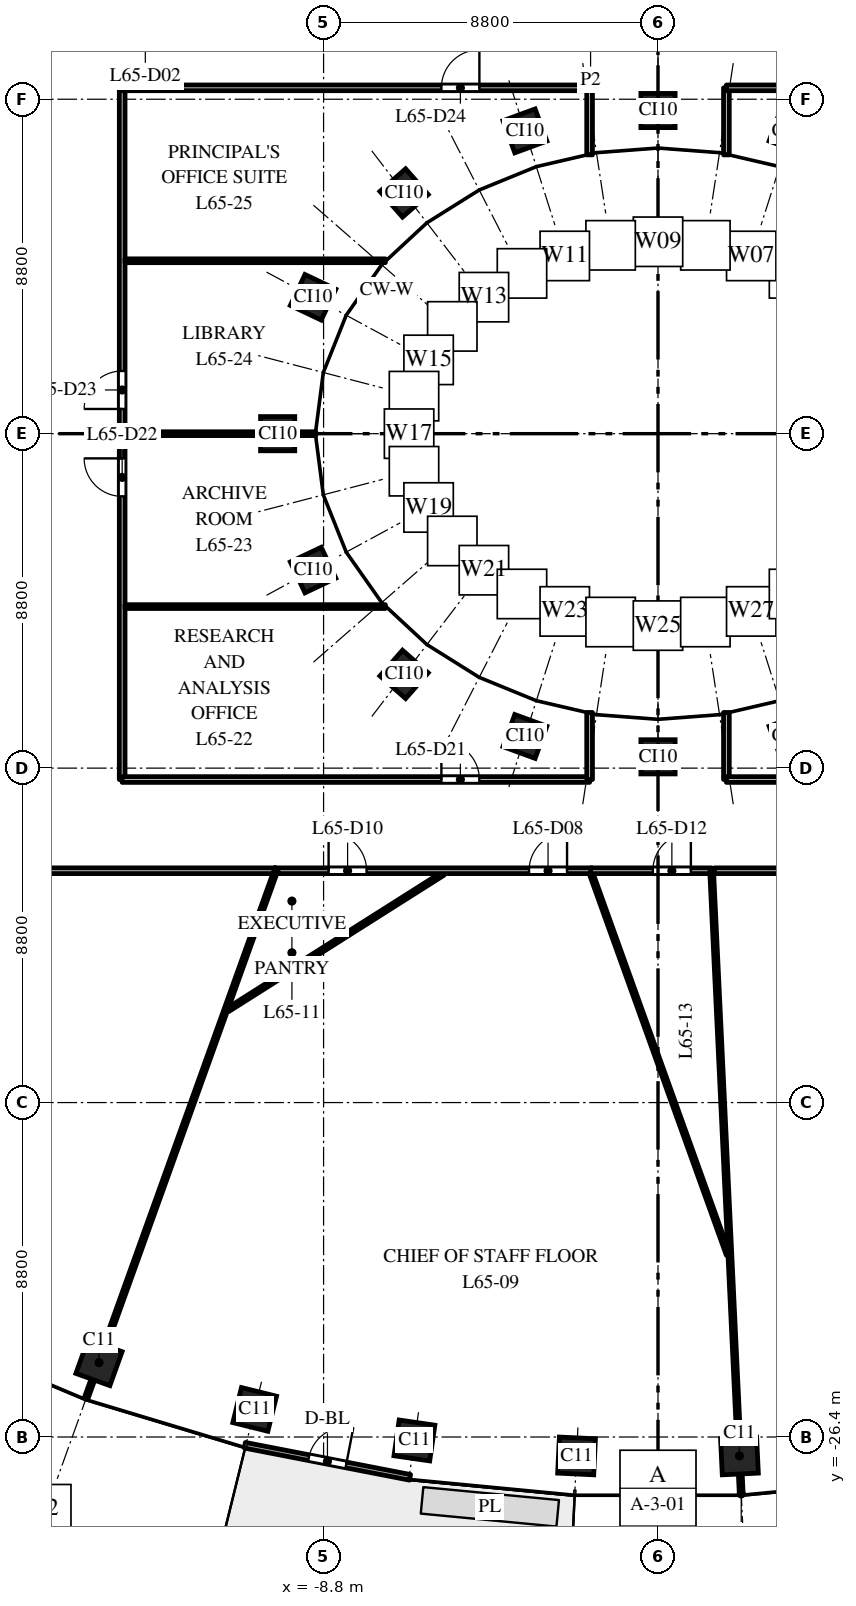
"""IFC4 building model, lengths in metres.
Left out: names, types, materials, properties, quantities, classifications, styles, units other than length and angle.
Written with IfcOpenShell. Run it as: python <this file> out.ifc"""

import sys

from ifc_helpers import new_model, si_unit, direction, frame, frame_2d, origin, origin_2d, place, context, subcontext, project, spatial, rectangle, extrude, element, fill, save


model = new_model("IFC4")
c1 = context("Model", 3, precision=1e-05, world=origin(), true_north=direction((0.0, 1.0)))
c2 = subcontext(c1, "Body", "Model", "MODEL_VIEW")
j1 = project(units=[si_unit("LENGTHUNIT", "METRE"), si_unit("PLANEANGLEUNIT", "RADIAN")], contexts=[c1])
p1 = place(None, origin())
s1 = spatial("IfcSite", under=j1, at=p1, CompositionType="ELEMENT")
p2 = place(p1, origin())
s2 = spatial("IfcBuilding", under=s1, at=p2, CompositionType="ELEMENT")
p3 = place(p2, frame((0.0, 0.0, 303.0)))
s3 = spatial("IfcBuildingStorey", under=s2, at=p3, CompositionType="ELEMENT", Elevation=303.0)
for number, where, z_axis, x_axis in (
    (1, (-14.709, -24.441, 0.0), (0.0, 0.0, 1.0), (0.941, -0.338, 0.0)),
    (2, (-10.613, -25.674, 0.0), (0.0, 0.0, 1.0), (0.971, -0.24, 0.0)),
    (3, (-6.409, -26.491, 0.0), (0.0, 0.0, 1.0), (0.99, -0.143, 0.0)),
    (4, (-2.143, -26.898, 0.0), (0.0, 0.0, 1.0), (0.999, -0.048, 0.0)),
    (5, (2.143, -26.898, 0.0), (0.0, 0.0, 1.0), (0.999, 0.048, 0.0)),
):
    element("IfcColumn", number, at=place(p3, frame(where, z_axis=z_axis, x_axis=x_axis)), inside=s3, PredefinedType="COLUMN", context=c2, shape_type="SweptSolid", body=[
        extrude(rectangle(XDim=0.95, YDim=0.95, at=origin_2d()), origin(), (0.0, 0.0, 1.0), 4.0),
    ])
for number, where, z_axis, x_axis in (
    (6, (3.501, 7.967, 0.0), (0.0, 0.0, 1.0), (-0.939, 0.344, 0.0)),
    (7, (0.0, 8.503, 0.0), (0.0, 0.0, 1.0), (-1.0, 0.0, 0.0)),
    (8, (-3.501, 7.967, 0.0), (0.0, 0.0, 1.0), (-0.939, -0.344, 0.0)),
    (9, (-6.682, 6.334, 0.0), (0.0, 0.0, 1.0), (-0.751, -0.66, 0.0)),
    (10, (-9.076, 3.588, 0.0), (0.0, 0.0, 1.0), (-0.429, -0.903, 0.0)),
    (11, (-10.008, 0.0, 0.0), (0.0, 0.0, 1.0), (0.0, -1.0, 0.0)),
    (12, (-9.076, -3.588, 0.0), (0.0, 0.0, 1.0), (0.429, -0.903, 0.0)),
    (13, (-6.682, -6.334, 0.0), (0.0, 0.0, 1.0), (0.751, -0.66, 0.0)),
    (14, (-3.501, -7.967, 0.0), (0.0, 0.0, 1.0), (0.939, -0.344, 0.0)),
    (15, (0.0, -8.503, 0.0), (0.0, 0.0, 1.0), (1.0, 0.0, 0.0)),
    (16, (3.501, -7.967, 0.0), (0.0, 0.0, 1.0), (0.939, 0.344, 0.0)),
):
    element("IfcColumn", number, at=place(p3, frame(where, z_axis=z_axis, x_axis=x_axis)), inside=s3, PredefinedType="COLUMN", context=c2, shape_type="SweptSolid", body=[
        extrude(rectangle(XDim=0.9, YDim=0.9, at=origin_2d()), origin(), (0.0, 0.0, 1.0), 4.0),
    ])
p4 = place(p3, frame((-10.871, -26.617, 0.0), z_axis=(0.0, 0.0, 1.0), x_axis=(0.981631174778, -0.190788460615, 0.0)))
e17 = element("IfcWall", 17, at=p4, inside=s3, PredefinedType="STANDARD", context=c2, shape_type="SweptSolid", body=[
    extrude(rectangle(XDim=4.426, YDim=0.15, at=frame_2d((2.213, 0.0))), origin(), (0.0, 0.0, 1.0), 3.7),
])
p5 = place(p4, frame((1.713, 0.0, 0.0)))
e18 = element("IfcOpeningElement", 18, at=p5, cuts=e17, PredefinedType="OPENING", context=c2, shape_type="SweptSolid", body=[
    extrude(rectangle(XDim=1.0, YDim=2.4, at=frame_2d((0.5, 1.2))), frame((0.0, 0.085, 0.0), z_axis=(0.0, -1.0, 0.0), x_axis=(1.0, 0.0, 0.0)), (0.0, 0.0, 1.0), 0.17),
])
p6 = place(p3, frame((-31.5, -11.5, 0.0), z_axis=(0.0, 0.0, 1.0), x_axis=(1.0, 0.0, 0.0)))
e19 = element("IfcWall", 19, at=p6, inside=s3, PredefinedType="PARTITIONING", context=c2, shape_type="SweptSolid", body=[
    extrude(rectangle(XDim=21.432, YDim=0.15, at=frame_2d((10.716, 0.0))), origin(), (0.0, 0.0, 1.0), 2.75),
])
p7 = place(p6, frame((1.4, 0.0, 0.0)))
e20 = element("IfcOpeningElement", 20, at=p7, cuts=e19, PredefinedType="OPENING", context=c2, shape_type="SweptSolid", body=[
    extrude(rectangle(XDim=1.0, YDim=2.1, at=frame_2d((0.5, 1.05))), frame((0.0, 0.085, 0.0), z_axis=(0.0, -1.0, 0.0), x_axis=(1.0, 0.0, 0.0)), (0.0, 0.0, 1.0), 0.17),
])
p8 = place(p6, frame((7.544, 0.0, 0.0)))
e21 = element("IfcOpeningElement", 21, at=p8, cuts=e19, PredefinedType="OPENING", context=c2, shape_type="SweptSolid", body=[
    extrude(rectangle(XDim=1.0, YDim=2.1, at=frame_2d((0.5, 1.05))), frame((0.0, 0.085, 0.0), z_axis=(0.0, -1.0, 0.0), x_axis=(1.0, 0.0, 0.0)), (0.0, 0.0, 1.0), 0.17),
])
p9 = place(p3, frame((-15.049, -25.383, 0.0), z_axis=(0.0, 0.0, 1.0), x_axis=(0.338454781071, 0.94098265721, 0.0)))
e22 = element("IfcWall", 22, at=p9, inside=s3, PredefinedType="PARTITIONING", context=c2, shape_type="SweptSolid", body=[
    extrude(rectangle(XDim=14.829, YDim=0.1, at=frame_2d((7.415, 0.0))), origin(), (0.0, 0.0, 1.0), 2.75),
])
p10 = place(p3, frame((-14.1, -9.1, 0.0), z_axis=(0.0, 0.0, 1.0), x_axis=(0.0, 1.0, 0.0)))
e23 = element("IfcWall", 23, at=p10, inside=s3, PredefinedType="PARTITIONING", context=c2, shape_type="SweptSolid", body=[
    extrude(rectangle(XDim=18.2, YDim=0.15, at=frame_2d((9.1, 0.0))), origin(), (0.0, 0.0, 1.0), 3.7),
])
p11 = place(p10, frame((7.45, 0.0, 0.0)))
e24 = element("IfcOpeningElement", 24, at=p11, cuts=e23, PredefinedType="OPENING", context=c2, shape_type="SweptSolid", body=[
    extrude(rectangle(XDim=1.0, YDim=2.1, at=frame_2d((0.5, 1.05))), frame((0.0, 0.085, 0.0), z_axis=(0.0, -1.0, 0.0), x_axis=(1.0, 0.0, 0.0)), (0.0, 0.0, 1.0), 0.17),
])
p12 = place(p10, frame((9.75, 0.0, 0.0)))
e25 = element("IfcOpeningElement", 25, at=p12, cuts=e23, PredefinedType="OPENING", context=c2, shape_type="SweptSolid", body=[
    extrude(rectangle(XDim=1.0, YDim=2.1, at=frame_2d((0.5, 1.05))), frame((0.0, 0.085, 0.0), z_axis=(0.0, -1.0, 0.0), x_axis=(1.0, 0.0, 0.0)), (0.0, 0.0, 1.0), 0.17),
])
p13 = place(p3, frame((-14.1, -9.1, 0.0), z_axis=(0.0, 0.0, 1.0), x_axis=(1.0, 0.0, 0.0)))
e26 = element("IfcWall", 26, at=p13, inside=s3, PredefinedType="PARTITIONING", context=c2, shape_type="SweptSolid", body=[
    extrude(rectangle(XDim=12.3, YDim=0.15, at=frame_2d((6.15, 0.0))), origin(), (0.0, 0.0, 1.0), 2.75),
])
p14 = place(p13, frame((8.4, 0.0, 0.0)))
e27 = element("IfcOpeningElement", 27, at=p14, cuts=e26, PredefinedType="OPENING", context=c2, shape_type="SweptSolid", body=[
    extrude(rectangle(XDim=1.0, YDim=2.1, at=frame_2d((0.5, 1.05))), frame((0.0, 0.085, 0.0), z_axis=(0.0, -1.0, 0.0), x_axis=(1.0, 0.0, 0.0)), (0.0, 0.0, 1.0), 0.17),
])
p15 = place(p3, frame((-14.025, -4.55, 0.0), z_axis=(0.0, 0.0, 1.0), x_axis=(1.0, 0.0, 0.0)))
e28 = element("IfcWall", 28, at=p15, inside=s3, PredefinedType="PARTITIONING", context=c2, shape_type="SweptSolid", body=[
    extrude(rectangle(XDim=6.851, YDim=0.1, at=frame_2d((3.425, 0.0))), origin(), (0.0, 0.0, 1.0), 3.0),
])
p16 = place(p3, frame((-14.025, 0.0, 0.0), z_axis=(0.0, 0.0, 1.0), x_axis=(1.0, 0.0, 0.0)))
e29 = element("IfcWall", 29, at=p16, inside=s3, PredefinedType="PARTITIONING", context=c2, shape_type="SweptSolid", body=[
    extrude(rectangle(XDim=5.02, YDim=0.1, at=frame_2d((2.51, 0.0))), origin(), (0.0, 0.0, 1.0), 3.7),
])
p17 = place(p3, frame((-14.025, 4.55, 0.0), z_axis=(0.0, 0.0, 1.0), x_axis=(1.0, 0.0, 0.0)))
e30 = element("IfcWall", 30, at=p17, inside=s3, PredefinedType="PARTITIONING", context=c2, shape_type="SweptSolid", body=[
    extrude(rectangle(XDim=6.851, YDim=0.1, at=frame_2d((3.425, 0.0))), origin(), (0.0, 0.0, 1.0), 3.0),
])
p18 = place(p3, frame((-14.1, 9.1, 0.0), z_axis=(0.0, 0.0, 1.0), x_axis=(1.0, 0.0, 0.0)))
e31 = element("IfcWall", 31, at=p18, inside=s3, PredefinedType="PARTITIONING", context=c2, shape_type="SweptSolid", body=[
    extrude(rectangle(XDim=12.3, YDim=0.15, at=frame_2d((6.15, 0.0))), origin(), (0.0, 0.0, 1.0), 2.75),
])
p19 = place(p18, frame((8.4, 0.0, 0.0)))
e32 = element("IfcOpeningElement", 32, at=p19, cuts=e31, PredefinedType="OPENING", context=c2, shape_type="SweptSolid", body=[
    extrude(rectangle(XDim=1.0, YDim=2.1, at=frame_2d((0.5, 1.05))), frame((0.0, 0.085, 0.0), z_axis=(0.0, -1.0, 0.0), x_axis=(1.0, 0.0, 0.0)), (0.0, 0.0, 1.0), 0.17),
])
p20 = place(p3, frame((-11.319, -15.161, 0.0), z_axis=(0.0, 0.0, 1.0), x_axis=(0.844865171483, 0.534979291203, 0.0)))
e33 = element("IfcWall", 33, at=p20, inside=s3, PredefinedType="PARTITIONING", context=c2, shape_type="SweptSolid", body=[
    extrude(rectangle(XDim=6.703, YDim=0.1, at=frame_2d((3.352, 0.0))), origin(), (0.0, 0.0, 1.0), 3.7),
])
p21 = place(p3, frame((-10.003, -11.5, 0.0), z_axis=(0.0, 0.0, 1.0), x_axis=(1.0, 0.0, 0.0)))
e34 = element("IfcWall", 34, at=p21, inside=s3, PredefinedType="PARTITIONING", context=c2, shape_type="SweptSolid", body=[
    extrude(rectangle(XDim=8.271, YDim=0.15, at=frame_2d((4.135, 0.0))), origin(), (0.0, 0.0, 1.0), 2.75),
])
p22 = place(p21, frame((6.61, 0.0, 0.0)))
e35 = element("IfcOpeningElement", 35, at=p22, cuts=e34, PredefinedType="OPENING", context=c2, shape_type="SweptSolid", body=[
    extrude(rectangle(XDim=1.0, YDim=2.1, at=frame_2d((0.5, 1.05))), frame((0.0, 0.085, 0.0), z_axis=(0.0, -1.0, 0.0), x_axis=(1.0, 0.0, 0.0)), (0.0, 0.0, 1.0), 0.17),
])
p23 = place(p21, frame((1.335, 0.0, 0.0)))
e36 = element("IfcOpeningElement", 36, at=p23, cuts=e34, PredefinedType="OPENING", context=c2, shape_type="SweptSolid", body=[
    extrude(rectangle(XDim=1.0, YDim=2.1, at=frame_2d((0.5, 1.05))), frame((0.0, 0.085, 0.0), z_axis=(0.0, -1.0, 0.0), x_axis=(1.0, 0.0, 0.0)), (0.0, 0.0, 1.0), 0.17),
])
for number, where, z_axis, x_axis in (
    (37, (-1.8, -9.1, 0.0), (0.0, 0.0, 1.0), (0.0, 1.0, 0.0)),
    (38, (-1.8, 7.336, 0.0), (0.0, 0.0, 1.0), (0.0, 1.0, 0.0)),
):
    element("IfcWall", number, at=place(p3, frame(where, z_axis=z_axis, x_axis=x_axis)), inside=s3, PredefinedType="PARTITIONING", context=c2, shape_type="SweptSolid", body=[
        extrude(rectangle(XDim=1.764, YDim=0.15, at=frame_2d((0.882, 0.0))), origin(), (0.0, 0.0, 1.0), 3.0),
    ])
p24 = place(p3, frame((-1.757, -11.579, 0.0), z_axis=(0.0, 0.0, 1.0), x_axis=(0.338284366688, -0.941043934816, 0.0)))
e39 = element("IfcWall", 39, at=p24, inside=s3, PredefinedType="PARTITIONING", context=c2, shape_type="SweptSolid", body=[
    extrude(rectangle(XDim=10.651, YDim=0.1, at=frame_2d((5.325, 0.0))), origin(), (0.0, 0.0, 1.0), 2.85),
])
p25 = place(p3, frame((-1.774, -11.5, 0.0), z_axis=(0.0, 0.0, 1.0), x_axis=(1.0, 0.0, 0.0)))
e40 = element("IfcWall", 40, at=p25, inside=s3, PredefinedType="PARTITIONING", context=c2, shape_type="SweptSolid", body=[
    extrude(rectangle(XDim=3.184, YDim=0.15, at=frame_2d((1.592, 0.0))), origin(), (0.0, 0.0, 1.0), 2.85),
])
p26 = place(p25, frame((1.639, 0.0, 0.0)))
e41 = element("IfcOpeningElement", 41, at=p26, cuts=e40, PredefinedType="OPENING", context=c2, shape_type="SweptSolid", body=[
    extrude(rectangle(XDim=1.0, YDim=2.1, at=frame_2d((0.5, 1.05))), frame((0.0, 0.085, 0.0), z_axis=(0.0, -1.0, 0.0), x_axis=(1.0, 0.0, 0.0)), (0.0, 0.0, 1.0), 0.17),
])
p27 = place(p3, frame((1.412, -11.51, 0.0), z_axis=(0.0, 0.0, 1.0), x_axis=(0.047410314178, -0.998875498803, 0.0)))
e42 = element("IfcWall", 42, at=p27, inside=s3, PredefinedType="PARTITIONING", context=c2, shape_type="SweptSolid", body=[
    extrude(rectangle(XDim=16.406, YDim=0.1, at=frame_2d((8.203, 0.0))), origin(), (0.0, 0.0, 1.0), 3.0),
])
p28 = place(p3, frame((1.8, -9.1, 0.0), z_axis=(0.0, 0.0, 1.0), x_axis=(0.0, 1.0, 0.0)))
e43 = element("IfcWall", 43, at=p28, inside=s3, PredefinedType="PARTITIONING", context=c2, shape_type="SweptSolid", body=[
    extrude(rectangle(XDim=1.764, YDim=0.15, at=frame_2d((0.882, 0.0))), origin(), (0.0, 0.0, 1.0), 3.0),
])
p29 = place(p3, frame((1.8, -9.1, 0.0), z_axis=(0.0, 0.0, 1.0), x_axis=(1.0, 0.0, 0.0)))
e44 = element("IfcWall", 44, at=p29, inside=s3, PredefinedType="PARTITIONING", context=c2, shape_type="SweptSolid", body=[
    extrude(rectangle(XDim=12.3, YDim=0.15, at=frame_2d((6.15, 0.0))), origin(), (0.0, 0.0, 1.0), 2.85),
])
p30 = place(p29, frame((10.65, 0.0, 0.0)))
e45 = element("IfcOpeningElement", 45, at=p30, cuts=e44, PredefinedType="OPENING", context=c2, shape_type="SweptSolid", body=[
    extrude(rectangle(XDim=1.0, YDim=2.1, at=frame_2d((0.5, 1.05))), frame((0.0, 0.085, 0.0), z_axis=(0.0, -1.0, 0.0), x_axis=(1.0, 0.0, 0.0)), (0.0, 0.0, 1.0), 0.17),
])
p31 = place(p3, frame((1.8, 7.336, 0.0), z_axis=(0.0, 0.0, 1.0), x_axis=(0.0, 1.0, 0.0)))
e46 = element("IfcWall", 46, at=p31, inside=s3, PredefinedType="PARTITIONING", context=c2, shape_type="SweptSolid", body=[
    extrude(rectangle(XDim=1.764, YDim=0.15, at=frame_2d((0.882, 0.0))), origin(), (0.0, 0.0, 1.0), 3.0),
])
p32 = place(p3, frame((1.8, 9.1, 0.0), z_axis=(0.0, 0.0, 1.0), x_axis=(1.0, 0.0, 0.0)))
e47 = element("IfcWall", 47, at=p32, inside=s3, PredefinedType="PARTITIONING", context=c2, shape_type="SweptSolid", body=[
    extrude(rectangle(XDim=12.3, YDim=0.15, at=frame_2d((6.15, 0.0))), origin(), (0.0, 0.0, 1.0), 2.85),
])
p33 = place(p32, frame((10.65, 0.0, 0.0)))
e48 = element("IfcOpeningElement", 48, at=p33, cuts=e47, PredefinedType="OPENING", context=c2, shape_type="SweptSolid", body=[
    extrude(rectangle(XDim=1.0, YDim=2.1, at=frame_2d((0.5, 1.05))), frame((0.0, 0.085, 0.0), z_axis=(0.0, -1.0, 0.0), x_axis=(1.0, 0.0, 0.0)), (0.0, 0.0, 1.0), 0.17),
])
p34 = place(p3, frame((1.485, -11.5, 0.0), z_axis=(0.0, 0.0, 1.0), x_axis=(1.0, 0.0, 0.0)))
e49 = element("IfcWall", 49, at=p34, inside=s3, PredefinedType="PARTITIONING", context=c2, shape_type="SweptSolid", body=[
    extrude(rectangle(XDim=30.015, YDim=0.15, at=frame_2d((15.007, 0.0))), origin(), (0.0, 0.0, 1.0), 2.75),
])
p35 = place(p34, frame((10.048, 0.0, 0.0)))
e50 = element("IfcOpeningElement", 50, at=p35, cuts=e49, PredefinedType="OPENING", context=c2, shape_type="SweptSolid", body=[
    extrude(rectangle(XDim=1.0, YDim=2.1, at=frame_2d((0.5, 1.05))), frame((0.0, 0.085, 0.0), z_axis=(0.0, -1.0, 0.0), x_axis=(1.0, 0.0, 0.0)), (0.0, 0.0, 1.0), 0.17),
])
p36 = place(p34, frame((19.294, 0.0, 0.0)))
e51 = element("IfcOpeningElement", 51, at=p36, cuts=e49, PredefinedType="OPENING", context=c2, shape_type="SweptSolid", body=[
    extrude(rectangle(XDim=1.0, YDim=2.1, at=frame_2d((0.5, 1.05))), frame((0.0, 0.085, 0.0), z_axis=(0.0, -1.0, 0.0), x_axis=(1.0, 0.0, 0.0)), (0.0, 0.0, 1.0), 0.17),
])
p37 = place(p34, frame((27.583, 0.0, 0.0)))
e52 = element("IfcOpeningElement", 52, at=p37, cuts=e49, PredefinedType="OPENING", context=c2, shape_type="SweptSolid", body=[
    extrude(rectangle(XDim=1.0, YDim=2.1, at=frame_2d((0.5, 1.05))), frame((0.0, 0.085, 0.0), z_axis=(0.0, -1.0, 0.0), x_axis=(1.0, 0.0, 0.0)), (0.0, 0.0, 1.0), 0.17),
])
p38 = place(p5, origin())
e53 = element("IfcDoor", 53, at=p38, inside=s3, OperationType="SINGLE_SWING_RIGHT", PredefinedType="DOOR", context=c2, shape_type="SweptSolid", body=[
    extrude(rectangle(XDim=1.0, YDim=2.4, at=frame_2d((0.5, 1.2))), frame((0.0, 0.025, 0.0), z_axis=(0.0, -1.0, 0.0), x_axis=(1.0, 0.0, 0.0)), (0.0, 0.0, 1.0), 0.05),
])
fill(e18, e53)
p39 = place(p22, origin())
e54 = element("IfcDoor", 54, at=p39, inside=s3, OperationType="SINGLE_SWING_RIGHT", PredefinedType="DOOR", context=c2, shape_type="SweptSolid", body=[
    extrude(rectangle(XDim=1.0, YDim=2.1, at=frame_2d((0.5, 1.05))), frame((0.0, 0.025, 0.0), z_axis=(0.0, -1.0, 0.0), x_axis=(1.0, 0.0, 0.0)), (0.0, 0.0, 1.0), 0.05),
])
fill(e35, e54)
p40 = place(p23, origin())
e55 = element("IfcDoor", 55, at=p40, inside=s3, OperationType="SINGLE_SWING_LEFT", PredefinedType="DOOR", context=c2, shape_type="SweptSolid", body=[
    extrude(rectangle(XDim=1.0, YDim=2.1, at=frame_2d((0.5, 1.05))), frame((0.0, 0.025, 0.0), z_axis=(0.0, -1.0, 0.0), x_axis=(1.0, 0.0, 0.0)), (0.0, 0.0, 1.0), 0.05),
])
fill(e36, e55)
p41 = place(p26, origin())
e56 = element("IfcDoor", 56, at=p41, inside=s3, OperationType="SINGLE_SWING_RIGHT", PredefinedType="DOOR", context=c2, shape_type="SweptSolid", body=[
    extrude(rectangle(XDim=1.0, YDim=2.1, at=frame_2d((0.5, 1.05))), frame((0.0, 0.025, 0.0), z_axis=(0.0, -1.0, 0.0), x_axis=(1.0, 0.0, 0.0)), (0.0, 0.0, 1.0), 0.05),
])
fill(e41, e56)
p42 = place(p14, origin())
e57 = element("IfcDoor", 57, at=p42, inside=s3, OperationType="SINGLE_SWING_LEFT", PredefinedType="DOOR", context=c2, shape_type="SweptSolid", body=[
    extrude(rectangle(XDim=1.0, YDim=2.1, at=frame_2d((0.5, 1.05))), frame((0.0, 0.025, 0.0), z_axis=(0.0, -1.0, 0.0), x_axis=(1.0, 0.0, 0.0)), (0.0, 0.0, 1.0), 0.05),
])
fill(e27, e57)
p43 = place(p11, origin())
e58 = element("IfcDoor", 58, at=p43, inside=s3, OperationType="SINGLE_SWING_RIGHT", PredefinedType="DOOR", context=c2, shape_type="SweptSolid", body=[
    extrude(rectangle(XDim=1.0, YDim=2.1, at=frame_2d((0.5, 1.05))), frame((0.0, 0.025, 0.0), z_axis=(0.0, -1.0, 0.0), x_axis=(1.0, 0.0, 0.0)), (0.0, 0.0, 1.0), 0.05),
])
fill(e24, e58)
p44 = place(p12, origin())
e59 = element("IfcDoor", 59, at=p44, inside=s3, OperationType="SINGLE_SWING_LEFT", PredefinedType="DOOR", context=c2, shape_type="SweptSolid", body=[
    extrude(rectangle(XDim=1.0, YDim=2.1, at=frame_2d((0.5, 1.05))), frame((0.0, 0.025, 0.0), z_axis=(0.0, -1.0, 0.0), x_axis=(1.0, 0.0, 0.0)), (0.0, 0.0, 1.0), 0.05),
])
fill(e25, e59)
p45 = place(p19, origin())
e60 = element("IfcDoor", 60, at=p45, inside=s3, OperationType="SINGLE_SWING_RIGHT", PredefinedType="DOOR", context=c2, shape_type="SweptSolid", body=[
    extrude(rectangle(XDim=1.0, YDim=2.1, at=frame_2d((0.5, 1.05))), frame((0.0, 0.025, 0.0), z_axis=(0.0, -1.0, 0.0), x_axis=(1.0, 0.0, 0.0)), (0.0, 0.0, 1.0), 0.05),
])
fill(e32, e60)
save(model, sys.argv[1])
